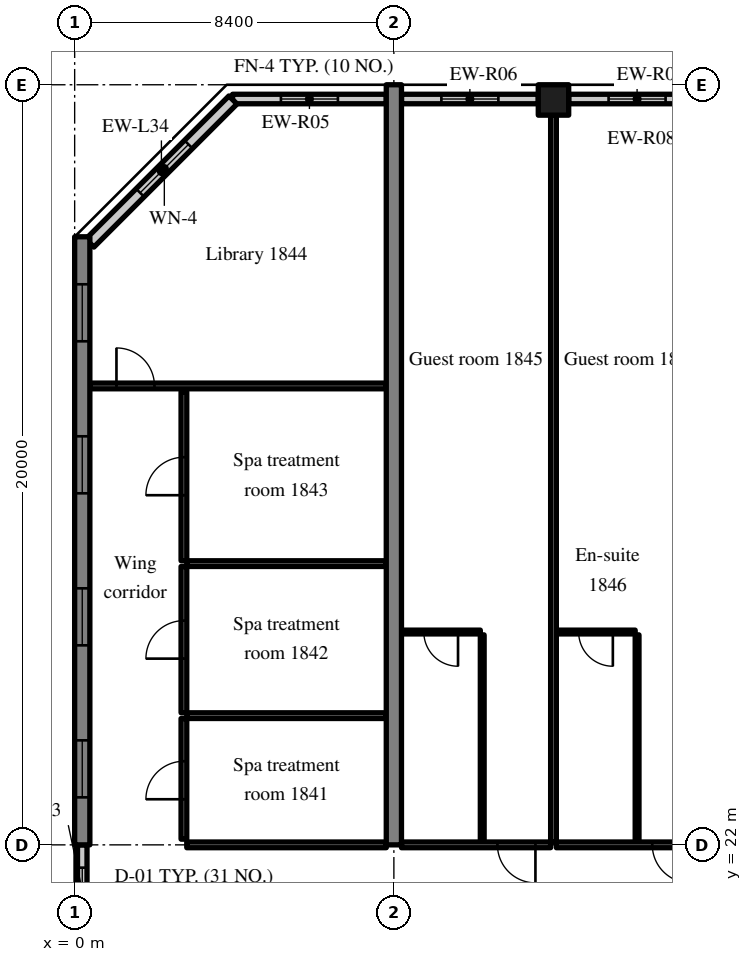
"""IFC4 building model, lengths in metres.
Left out: names, types, materials, properties, quantities, classifications, styles, units other than length and angle.
Written with IfcOpenShell. Run it as: python <this file> out.ifc"""

import sys

from ifc_helpers import new_model, si_unit, direction, frame, frame_2d, origin, origin_2d, place, context, subcontext, project, spatial, rectangle, extrude, source, transform, mapped, element, fill, save


model = new_model("IFC4")
c1 = context("Model", 3, precision=1e-05, world=origin(), true_north=direction((0.0, 1.0)))
c2 = subcontext(c1, "Body", "Model", "MODEL_VIEW")
j1 = project(units=[si_unit("LENGTHUNIT", "METRE"), si_unit("PLANEANGLEUNIT", "RADIAN")], contexts=[c1])
p1 = place(None, origin())
s1 = spatial("IfcSite", under=j1, at=p1, CompositionType="ELEMENT")
p2 = place(p1, origin())
s2 = spatial("IfcBuilding", under=s1, at=p2, CompositionType="ELEMENT")
p3 = place(p2, frame((0.0, 0.0, 77.2)))
s3 = spatial("IfcBuildingStorey", under=s2, at=p3, CompositionType="ELEMENT", Elevation=77.2)
m1 = source(origin(), c2, "Body", "SweptSolid", [
    extrude(rectangle(XDim=16.0, YDim=0.4, at=frame_2d((8.0, 0.0))), origin(), (0.0, 0.0, 1.0), 3.52),
])
p4 = place(p3, frame((0.2, 22.0, 0.0), z_axis=(0.0, 0.0, 1.0), x_axis=(0.0, 1.0, 0.0)))
e1 = element("IfcWall", 1, at=p4, inside=s3, PredefinedType="SHEAR", context=c2, shape_type="MappedRepresentation", body=[
    mapped(m1, transform((0.0, 0.0, 0.0), scale=1.0)),
])
m2 = source(origin(), c2, "Body", "SweptSolid", [
    extrude(rectangle(XDim=1.5, YDim=1.5, at=frame_2d((0.75, 0.75))), frame((0.0, 0.21, 0.0), z_axis=(0.0, -1.0, 0.0), x_axis=(1.0, 0.0, 0.0)), (0.0, 0.0, 1.0), 0.42),
])
p5 = place(p4, frame((1.25, 0.0, 0.9)))
e2 = element("IfcOpeningElement", 2, at=p5, cuts=e1, PredefinedType="OPENING", context=c2, shape_type="MappedRepresentation", body=[
    mapped(m2, transform((0.0, 0.0, 0.0), scale=1.0)),
])
p6 = place(p4, frame((5.25, 0.0, 0.9)))
e3 = element("IfcOpeningElement", 3, at=p6, cuts=e1, PredefinedType="OPENING", context=c2, shape_type="MappedRepresentation", body=[
    mapped(m2, transform((0.0, 0.0, 0.0), scale=1.0)),
])
p7 = place(p4, frame((9.25, 0.0, 0.9)))
e4 = element("IfcOpeningElement", 4, at=p7, cuts=e1, PredefinedType="OPENING", context=c2, shape_type="MappedRepresentation", body=[
    mapped(m2, transform((0.0, 0.0, 0.0), scale=1.0)),
])
p8 = place(p4, frame((13.25, 0.0, 0.9)))
e5 = element("IfcOpeningElement", 5, at=p8, cuts=e1, PredefinedType="OPENING", context=c2, shape_type="MappedRepresentation", body=[
    mapped(m2, transform((0.0, 0.0, 0.0), scale=1.0)),
])
m3 = source(origin(), c2, "Body", "SweptSolid", [
    extrude(rectangle(XDim=20.0, YDim=0.4, at=frame_2d((10.0, 0.0))), origin(), (0.0, 0.0, 1.0), 3.52),
])
p9 = place(p3, frame((8.4, 22.0, 0.0), z_axis=(0.0, 0.0, 1.0), x_axis=(0.0, 1.0, 0.0)))
e6 = element("IfcWall", 6, at=p9, inside=s3, PredefinedType="SHEAR", context=c2, shape_type="MappedRepresentation", body=[
    mapped(m3, transform((0.0, 0.0, 0.0), scale=1.0)),
])
m4 = source(origin(), c2, "Body", "SweptSolid", [
    extrude(rectangle(XDim=0.8, YDim=0.8, at=origin_2d()), origin(), (0.0, 0.0, 1.0), 3.52),
])
p10 = place(p3, frame((12.6, 41.6, 0.0), z_axis=(0.0, 0.0, 1.0), x_axis=(1.0, 0.0, 0.0)))
e7 = element("IfcColumn", 7, at=p10, inside=s3, PredefinedType="COLUMN", context=c2, shape_type="MappedRepresentation", body=[
    mapped(m4, transform((0.0, 0.0, 0.0), scale=1.0)),
])
m5 = source(origin(), c2, "Body", "SweptSolid", [
    extrude(rectangle(XDim=4.045, YDim=0.25, at=frame_2d((2.022, 0.0))), origin(), (0.0, 0.0, 1.0), 2.82),
])
p11 = place(p3, frame((8.2, 41.625, 0.0), z_axis=(0.0, 0.0, 1.0), x_axis=(-1.0, 0.0, 0.0)))
e8 = element("IfcWall", 8, at=p11, inside=s3, PredefinedType="SOLIDWALL", context=c2, shape_type="MappedRepresentation", body=[
    mapped(m5, transform((0.0, 0.0, 0.0), scale=1.0)),
])
m6 = source(origin(), c2, "Body", "SweptSolid", [
    extrude(rectangle(XDim=1.5, YDim=1.5, at=frame_2d((0.75, 0.75))), frame((0.0, 0.135, 0.0), z_axis=(0.0, -1.0, 0.0), x_axis=(1.0, 0.0, 0.0)), (0.0, 0.0, 1.0), 0.27),
])
p12 = place(p11, frame((1.272, 0.0, 0.9)))
e9 = element("IfcOpeningElement", 9, at=p12, cuts=e8, PredefinedType="OPENING", context=c2, shape_type="MappedRepresentation", body=[
    mapped(m6, transform((0.0, 0.0, 0.0), scale=1.0)),
])
m7 = source(origin(), c2, "Body", "SweptSolid", [
    extrude(rectangle(XDim=3.6, YDim=0.25, at=frame_2d((1.8, 0.0))), origin(), (0.0, 0.0, 1.0), 2.82),
])
p13 = place(p3, frame((12.2, 41.625, 0.0), z_axis=(0.0, 0.0, 1.0), x_axis=(-1.0, 0.0, 0.0)))
e10 = element("IfcWall", 10, at=p13, inside=s3, PredefinedType="SOLIDWALL", context=c2, shape_type="MappedRepresentation", body=[
    mapped(m7, transform((0.0, 0.0, 0.0), scale=1.0)),
])
p14 = place(p13, frame((1.05, 0.0, 0.9)))
e11 = element("IfcOpeningElement", 11, at=p14, cuts=e10, PredefinedType="OPENING", context=c2, shape_type="MappedRepresentation", body=[
    mapped(m6, transform((0.0, 0.0, 0.0), scale=1.0)),
])
m8 = source(origin(), c2, "Body", "SweptSolid", [
    extrude(rectangle(XDim=3.6, YDim=0.25, at=frame_2d((1.8, 0.0))), origin(), (0.0, 0.0, 1.0), 2.82),
])
p15 = place(p3, frame((16.6, 41.625, 0.0), z_axis=(0.0, 0.0, 1.0), x_axis=(-1.0, 0.0, 0.0)))
e12 = element("IfcWall", 12, at=p15, inside=s3, PredefinedType="SOLIDWALL", context=c2, shape_type="MappedRepresentation", body=[
    mapped(m8, transform((0.0, 0.0, 0.0), scale=1.0)),
])
p16 = place(p15, frame((1.05, 0.0, 0.9)))
e13 = element("IfcOpeningElement", 13, at=p16, cuts=e12, PredefinedType="OPENING", context=c2, shape_type="MappedRepresentation", body=[
    mapped(m6, transform((0.0, 0.0, 0.0), scale=1.0)),
])
m9 = source(origin(), c2, "Body", "SweptSolid", [
    extrude(rectangle(XDim=5.326, YDim=0.3, at=frame_2d((2.663, 0.0))), origin(), (0.0, 0.0, 1.0), 3.52),
])
p17 = place(p3, frame((4.166, 41.6, 0.0), z_axis=(0.0, 0.0, 1.0), x_axis=(-0.707106781187, -0.707106781187, 0.0)))
e14 = element("IfcWall", 14, at=p17, inside=s3, PredefinedType="SOLIDWALL", context=c2, shape_type="MappedRepresentation", body=[
    mapped(m9, transform((0.0, 0.0, 0.0), scale=1.0)),
])
m10 = source(origin(), c2, "Body", "SweptSolid", [
    extrude(rectangle(XDim=1.8, YDim=1.5, at=frame_2d((0.9, 0.75))), frame((0.0, 0.16, 0.0), z_axis=(0.0, -1.0, 0.0), x_axis=(1.0, 0.0, 0.0)), (0.0, 0.0, 1.0), 0.32),
])
p18 = place(p17, frame((1.654, 0.0, 0.9)))
e15 = element("IfcOpeningElement", 15, at=p18, cuts=e14, PredefinedType="OPENING", context=c2, shape_type="MappedRepresentation", body=[
    mapped(m10, transform((0.0, 0.0, 0.0), scale=1.0)),
])
m11 = source(origin(), c2, "Body", "SweptSolid", [
    extrude(rectangle(XDim=2.4, YDim=0.25, at=frame_2d((1.2, 0.0))), origin(), (0.0, 0.0, 1.0), 2.62),
])
p19 = place(p3, frame((0.2, 19.6, 0.0), z_axis=(0.0, 0.0, 1.0), x_axis=(0.0, 1.0, 0.0)))
e16 = element("IfcWall", 16, at=p19, inside=s3, PredefinedType="SOLIDWALL", context=c2, shape_type="MappedRepresentation", body=[
    mapped(m11, transform((0.0, 0.0, 0.0), scale=1.0)),
])
m12 = source(origin(), c2, "Body", "SweptSolid", [
    extrude(rectangle(XDim=1.2, YDim=1.5, at=frame_2d((0.6, 0.75))), frame((0.0, 0.135, 0.0), z_axis=(0.0, -1.0, 0.0), x_axis=(1.0, 0.0, 0.0)), (0.0, 0.0, 1.0), 0.27),
])
p20 = place(p19, frame((0.6, 0.0, 0.9)))
e17 = element("IfcOpeningElement", 17, at=p20, cuts=e16, PredefinedType="OPENING", context=c2, shape_type="MappedRepresentation", body=[
    mapped(m12, transform((0.0, 0.0, 0.0), scale=1.0)),
])
m13 = source(origin(), c2, "Body", "SweptSolid", [
    extrude(rectangle(XDim=5.25, YDim=0.15, at=frame_2d((2.625, 0.0))), origin(), (0.0, 0.0, 1.0), 2.82),
])
p21 = place(p3, frame((2.95, 22.0, 0.0), z_axis=(0.0, 0.0, 1.0), x_axis=(1.0, 0.0, 0.0)))
e18 = element("IfcWall", 18, at=p21, inside=s3, PredefinedType="PARTITIONING", context=c2, shape_type="MappedRepresentation", body=[
    mapped(m13, transform((0.0, 0.0, 0.0), scale=1.0)),
])
m14 = source(origin(), c2, "Body", "SweptSolid", [
    extrude(rectangle(XDim=3.175, YDim=0.15, at=frame_2d((1.587, 0.0))), origin(), (0.0, 0.0, 1.0), 3.52),
])
p22 = place(p3, frame((2.875, 22.15, 0.0), z_axis=(0.0, 0.0, 1.0), x_axis=(0.0, 1.0, 0.0)))
e19 = element("IfcWall", 19, at=p22, inside=s3, PredefinedType="PARTITIONING", context=c2, shape_type="MappedRepresentation", body=[
    mapped(m14, transform((0.0, 0.0, 0.0), scale=1.0)),
])
m15 = source(origin(), c2, "Body", "SweptSolid", [
    extrude(rectangle(XDim=1.0, YDim=2.1, at=frame_2d((0.5, 1.05))), frame((0.0, 0.085, 0.0), z_axis=(0.0, -1.0, 0.0), x_axis=(1.0, 0.0, 0.0)), (0.0, 0.0, 1.0), 0.17),
])
p23 = place(p22, frame((1.05, 0.0, 0.0)))
e20 = element("IfcOpeningElement", 20, at=p23, cuts=e19, PredefinedType="OPENING", context=c2, shape_type="MappedRepresentation", body=[
    mapped(m15, transform((0.0, 0.0, 0.0), scale=1.0)),
])
m16 = source(origin(), c2, "Body", "SweptSolid", [
    extrude(rectangle(XDim=5.25, YDim=0.15, at=frame_2d((2.625, 0.0))), origin(), (0.0, 0.0, 1.0), 3.52),
])
p24 = place(p3, frame((2.95, 25.4, 0.0), z_axis=(0.0, 0.0, 1.0), x_axis=(1.0, 0.0, 0.0)))
e21 = element("IfcWall", 21, at=p24, inside=s3, PredefinedType="PARTITIONING", context=c2, shape_type="MappedRepresentation", body=[
    mapped(m16, transform((0.0, 0.0, 0.0), scale=1.0)),
])
m17 = source(origin(), c2, "Body", "SweptSolid", [
    extrude(rectangle(XDim=3.85, YDim=0.15, at=frame_2d((1.925, 0.0))), origin(), (0.0, 0.0, 1.0), 3.52),
])
p25 = place(p3, frame((2.875, 25.475, 0.0), z_axis=(0.0, 0.0, 1.0), x_axis=(0.0, 1.0, 0.0)))
e22 = element("IfcWall", 22, at=p25, inside=s3, PredefinedType="PARTITIONING", context=c2, shape_type="MappedRepresentation", body=[
    mapped(m17, transform((0.0, 0.0, 0.0), scale=1.0)),
])
p26 = place(p25, frame((1.425, 0.0, 0.0)))
e23 = element("IfcOpeningElement", 23, at=p26, cuts=e22, PredefinedType="OPENING", context=c2, shape_type="MappedRepresentation", body=[
    mapped(m15, transform((0.0, 0.0, 0.0), scale=1.0)),
])
p27 = place(p3, frame((2.95, 29.4, 0.0), z_axis=(0.0, 0.0, 1.0), x_axis=(1.0, 0.0, 0.0)))
e24 = element("IfcWall", 24, at=p27, inside=s3, PredefinedType="PARTITIONING", context=c2, shape_type="MappedRepresentation", body=[
    mapped(m16, transform((0.0, 0.0, 0.0), scale=1.0)),
])
m18 = source(origin(), c2, "Body", "SweptSolid", [
    extrude(rectangle(XDim=4.45, YDim=0.15, at=frame_2d((2.225, 0.0))), origin(), (0.0, 0.0, 1.0), 3.52),
])
p28 = place(p3, frame((2.875, 29.475, 0.0), z_axis=(0.0, 0.0, 1.0), x_axis=(0.0, 1.0, 0.0)))
e25 = element("IfcWall", 25, at=p28, inside=s3, PredefinedType="PARTITIONING", context=c2, shape_type="MappedRepresentation", body=[
    mapped(m18, transform((0.0, 0.0, 0.0), scale=1.0)),
])
p29 = place(p28, frame((1.725, 0.0, 0.0)))
e26 = element("IfcOpeningElement", 26, at=p29, cuts=e25, PredefinedType="OPENING", context=c2, shape_type="MappedRepresentation", body=[
    mapped(m15, transform((0.0, 0.0, 0.0), scale=1.0)),
])
m19 = source(origin(), c2, "Body", "SweptSolid", [
    extrude(rectangle(XDim=7.8, YDim=0.15, at=frame_2d((3.9, 0.0))), origin(), (0.0, 0.0, 1.0), 3.52),
])
p30 = place(p3, frame((0.4, 34.075, 0.0), z_axis=(0.0, 0.0, 1.0), x_axis=(1.0, 0.0, 0.0)))
e27 = element("IfcWall", 27, at=p30, inside=s3, PredefinedType="PARTITIONING", context=c2, shape_type="MappedRepresentation", body=[
    mapped(m19, transform((0.0, 0.0, 0.0), scale=1.0)),
])
p31 = place(p30, frame((0.7, 0.0, 0.0)))
e28 = element("IfcOpeningElement", 28, at=p31, cuts=e27, PredefinedType="OPENING", context=c2, shape_type="MappedRepresentation", body=[
    mapped(m15, transform((0.0, 0.0, 0.0), scale=1.0)),
])
m20 = source(origin(), c2, "Body", "SweptSolid", [
    extrude(rectangle(XDim=5.45, YDim=0.1, at=frame_2d((2.725, 0.0))), origin(), (0.0, 0.0, 1.0), 3.52),
])
p32 = place(p3, frame((10.725, 22.075, 0.0), z_axis=(0.0, 0.0, 1.0), x_axis=(0.0, 1.0, 0.0)))
e29 = element("IfcWall", 29, at=p32, inside=s3, PredefinedType="PARTITIONING", context=c2, shape_type="MappedRepresentation", body=[
    mapped(m20, transform((0.0, 0.0, 0.0), scale=1.0)),
])
m21 = source(origin(), c2, "Body", "SweptSolid", [
    extrude(rectangle(XDim=2.075, YDim=0.1, at=frame_2d((1.038, 0.0))), origin(), (0.0, 0.0, 1.0), 3.52),
])
p33 = place(p3, frame((8.6, 27.6, 0.0), z_axis=(0.0, 0.0, 1.0), x_axis=(1.0, 0.0, 0.0)))
e30 = element("IfcWall", 30, at=p33, inside=s3, PredefinedType="PARTITIONING", context=c2, shape_type="MappedRepresentation", body=[
    mapped(m21, transform((0.0, 0.0, 0.0), scale=1.0)),
])
m22 = source(origin(), c2, "Body", "SweptSolid", [
    extrude(rectangle(XDim=0.9, YDim=2.1, at=frame_2d((0.45, 1.05))), frame((0.0, 0.06, 0.0), z_axis=(0.0, -1.0, 0.0), x_axis=(1.0, 0.0, 0.0)), (0.0, 0.0, 1.0), 0.12),
])
p34 = place(p33, frame((0.588, 0.0, 0.0)))
e31 = element("IfcOpeningElement", 31, at=p34, cuts=e30, PredefinedType="OPENING", context=c2, shape_type="MappedRepresentation", body=[
    mapped(m22, transform((0.0, 0.0, 0.0), scale=1.0)),
])
m23 = source(origin(), c2, "Body", "SweptSolid", [
    extrude(rectangle(XDim=3.925, YDim=0.15, at=frame_2d((1.962, 0.0))), origin(), (0.0, 0.0, 1.0), 2.82),
])
p35 = place(p3, frame((8.6, 22.0, 0.0), z_axis=(0.0, 0.0, 1.0), x_axis=(1.0, 0.0, 0.0)))
e32 = element("IfcWall", 32, at=p35, inside=s3, PredefinedType="PARTITIONING", context=c2, shape_type="MappedRepresentation", body=[
    mapped(m23, transform((0.0, 0.0, 0.0), scale=1.0)),
])
p36 = place(p35, frame((2.525, 0.0, 0.0)))
e33 = element("IfcOpeningElement", 33, at=p36, cuts=e32, PredefinedType="OPENING", context=c2, shape_type="MappedRepresentation", body=[
    mapped(m15, transform((0.0, 0.0, 0.0), scale=1.0)),
])
p37 = place(p3, frame((14.8, 22.075, 0.0), z_axis=(0.0, 0.0, 1.0), x_axis=(0.0, 1.0, 0.0)))
e34 = element("IfcWall", 34, at=p37, inside=s3, PredefinedType="PARTITIONING", context=c2, shape_type="MappedRepresentation", body=[
    mapped(m20, transform((0.0, 0.0, 0.0), scale=1.0)),
])
p38 = place(p3, frame((12.675, 27.6, 0.0), z_axis=(0.0, 0.0, 1.0), x_axis=(1.0, 0.0, 0.0)))
e35 = element("IfcWall", 35, at=p38, inside=s3, PredefinedType="PARTITIONING", context=c2, shape_type="MappedRepresentation", body=[
    mapped(m21, transform((0.0, 0.0, 0.0), scale=1.0)),
])
p39 = place(p38, frame((0.587, 0.0, 0.0)))
e36 = element("IfcOpeningElement", 36, at=p39, cuts=e35, PredefinedType="OPENING", context=c2, shape_type="MappedRepresentation", body=[
    mapped(m22, transform((0.0, 0.0, 0.0), scale=1.0)),
])
m24 = source(origin(), c2, "Body", "SweptSolid", [
    extrude(rectangle(XDim=3.925, YDim=0.15, at=frame_2d((1.962, 0.0))), origin(), (0.0, 0.0, 1.0), 2.82),
])
p40 = place(p3, frame((12.675, 22.0, 0.0), z_axis=(0.0, 0.0, 1.0), x_axis=(1.0, 0.0, 0.0)))
e37 = element("IfcWall", 37, at=p40, inside=s3, PredefinedType="PARTITIONING", context=c2, shape_type="MappedRepresentation", body=[
    mapped(m24, transform((0.0, 0.0, 0.0), scale=1.0)),
])
p41 = place(p40, frame((2.525, 0.0, 0.0)))
e38 = element("IfcOpeningElement", 38, at=p41, cuts=e37, PredefinedType="OPENING", context=c2, shape_type="MappedRepresentation", body=[
    mapped(m15, transform((0.0, 0.0, 0.0), scale=1.0)),
])
m25 = source(origin(), c2, "Body", "SweptSolid", [
    extrude(rectangle(XDim=19.125, YDim=0.15, at=frame_2d((9.562, 0.0))), origin(), (0.0, 0.0, 1.0), 3.52),
])
p42 = place(p3, frame((12.6, 22.075, 0.0), z_axis=(0.0, 0.0, 1.0), x_axis=(0.0, 1.0, 0.0)))
e39 = element("IfcWall", 39, at=p42, inside=s3, PredefinedType="PARTITIONING", context=c2, shape_type="MappedRepresentation", body=[
    mapped(m25, transform((0.0, 0.0, 0.0), scale=1.0)),
])
m26 = source(origin(), c2, "Body", "SweptSolid", [
    extrude(rectangle(XDim=1.5, YDim=1.5, at=frame_2d((0.75, 0.75))), frame((0.0, 0.03, 0.0), z_axis=(0.0, -1.0, 0.0), x_axis=(1.0, 0.0, 0.0)), (0.0, 0.0, 1.0), 0.06),
])
p43 = place(p12, origin())
e40 = element("IfcWindow", 40, at=p43, inside=s3, PartitioningType="SINGLE_PANEL", PredefinedType="WINDOW", context=c2, shape_type="MappedRepresentation", body=[
    mapped(m26, transform((0.0, 0.0, 0.0), scale=1.0)),
])
fill(e9, e40)
p44 = place(p14, origin())
e41 = element("IfcWindow", 41, at=p44, inside=s3, PartitioningType="SINGLE_PANEL", PredefinedType="WINDOW", context=c2, shape_type="MappedRepresentation", body=[
    mapped(m26, transform((0.0, 0.0, 0.0), scale=1.0)),
])
fill(e11, e41)
p45 = place(p16, origin())
e42 = element("IfcWindow", 42, at=p45, inside=s3, PartitioningType="SINGLE_PANEL", PredefinedType="WINDOW", context=c2, shape_type="MappedRepresentation", body=[
    mapped(m26, transform((0.0, 0.0, 0.0), scale=1.0)),
])
fill(e13, e42)
m27 = source(origin(), c2, "Body", "SweptSolid", [
    extrude(rectangle(XDim=1.8, YDim=1.5, at=frame_2d((0.9, 0.75))), frame((0.0, 0.03, 0.0), z_axis=(0.0, -1.0, 0.0), x_axis=(1.0, 0.0, 0.0)), (0.0, 0.0, 1.0), 0.06),
])
p46 = place(p18, origin())
e43 = element("IfcWindow", 43, at=p46, inside=s3, PartitioningType="SINGLE_PANEL", PredefinedType="WINDOW", context=c2, shape_type="MappedRepresentation", body=[
    mapped(m27, transform((0.0, 0.0, 0.0), scale=1.0)),
])
fill(e15, e43)
p47 = place(p5, origin())
e44 = element("IfcWindow", 44, at=p47, inside=s3, PartitioningType="SINGLE_PANEL", PredefinedType="WINDOW", context=c2, shape_type="MappedRepresentation", body=[
    mapped(m26, transform((0.0, 0.0, 0.0), scale=1.0)),
])
fill(e2, e44)
p48 = place(p6, origin())
e45 = element("IfcWindow", 45, at=p48, inside=s3, PartitioningType="SINGLE_PANEL", PredefinedType="WINDOW", context=c2, shape_type="MappedRepresentation", body=[
    mapped(m26, transform((0.0, 0.0, 0.0), scale=1.0)),
])
fill(e3, e45)
p49 = place(p7, origin())
e46 = element("IfcWindow", 46, at=p49, inside=s3, PartitioningType="SINGLE_PANEL", PredefinedType="WINDOW", context=c2, shape_type="MappedRepresentation", body=[
    mapped(m26, transform((0.0, 0.0, 0.0), scale=1.0)),
])
fill(e4, e46)
p50 = place(p8, origin())
e47 = element("IfcWindow", 47, at=p50, inside=s3, PartitioningType="SINGLE_PANEL", PredefinedType="WINDOW", context=c2, shape_type="MappedRepresentation", body=[
    mapped(m26, transform((0.0, 0.0, 0.0), scale=1.0)),
])
fill(e5, e47)
m28 = source(origin(), c2, "Body", "SweptSolid", [
    extrude(rectangle(XDim=1.2, YDim=1.5, at=frame_2d((0.6, 0.75))), frame((0.0, 0.03, 0.0), z_axis=(0.0, -1.0, 0.0), x_axis=(1.0, 0.0, 0.0)), (0.0, 0.0, 1.0), 0.06),
])
p51 = place(p20, origin())
e48 = element("IfcWindow", 48, at=p51, inside=s3, PartitioningType="SINGLE_PANEL", PredefinedType="WINDOW", context=c2, shape_type="MappedRepresentation", body=[
    mapped(m28, transform((0.0, 0.0, 0.0), scale=1.0)),
])
fill(e17, e48)
m29 = source(origin(), c2, "Body", "SweptSolid", [
    extrude(rectangle(XDim=1.0, YDim=2.1, at=frame_2d((0.5, 1.05))), frame((0.0, 0.025, 0.0), z_axis=(0.0, -1.0, 0.0), x_axis=(1.0, 0.0, 0.0)), (0.0, 0.0, 1.0), 0.05),
])
p52 = place(p23, origin())
e49 = element("IfcDoor", 49, at=p52, inside=s3, OperationType="SINGLE_SWING_LEFT", PredefinedType="DOOR", context=c2, shape_type="MappedRepresentation", body=[
    mapped(m29, transform((0.0, 0.0, 0.0), scale=1.0)),
])
fill(e20, e49)
p53 = place(p26, origin())
e50 = element("IfcDoor", 50, at=p53, inside=s3, OperationType="SINGLE_SWING_LEFT", PredefinedType="DOOR", context=c2, shape_type="MappedRepresentation", body=[
    mapped(m29, transform((0.0, 0.0, 0.0), scale=1.0)),
])
fill(e23, e50)
p54 = place(p29, origin())
e51 = element("IfcDoor", 51, at=p54, inside=s3, OperationType="SINGLE_SWING_LEFT", PredefinedType="DOOR", context=c2, shape_type="MappedRepresentation", body=[
    mapped(m29, transform((0.0, 0.0, 0.0), scale=1.0)),
])
fill(e26, e51)
p55 = place(p31, origin())
e52 = element("IfcDoor", 52, at=p55, inside=s3, OperationType="SINGLE_SWING_LEFT", PredefinedType="DOOR", context=c2, shape_type="MappedRepresentation", body=[
    mapped(m29, transform((0.0, 0.0, 0.0), scale=1.0)),
])
fill(e28, e52)
m30 = source(origin(), c2, "Body", "SweptSolid", [
    extrude(rectangle(XDim=0.9, YDim=2.1, at=frame_2d((0.45, 1.05))), frame((0.0, 0.025, 0.0), z_axis=(0.0, -1.0, 0.0), x_axis=(1.0, 0.0, 0.0)), (0.0, 0.0, 1.0), 0.05),
])
p56 = place(p34, origin())
e53 = element("IfcDoor", 53, at=p56, inside=s3, OperationType="SINGLE_SWING_RIGHT", PredefinedType="DOOR", context=c2, shape_type="MappedRepresentation", body=[
    mapped(m30, transform((0.0, 0.0, 0.0), scale=1.0)),
])
fill(e31, e53)
p57 = place(p36, origin())
e54 = element("IfcDoor", 54, at=p57, inside=s3, OperationType="SINGLE_SWING_RIGHT", PredefinedType="DOOR", context=c2, shape_type="MappedRepresentation", body=[
    mapped(m29, transform((0.0, 0.0, 0.0), scale=1.0)),
])
fill(e33, e54)
p58 = place(p39, origin())
e55 = element("IfcDoor", 55, at=p58, inside=s3, OperationType="SINGLE_SWING_RIGHT", PredefinedType="DOOR", context=c2, shape_type="MappedRepresentation", body=[
    mapped(m30, transform((0.0, 0.0, 0.0), scale=1.0)),
])
fill(e36, e55)
p59 = place(p41, origin())
e56 = element("IfcDoor", 56, at=p59, inside=s3, OperationType="SINGLE_SWING_RIGHT", PredefinedType="DOOR", context=c2, shape_type="MappedRepresentation", body=[
    mapped(m29, transform((0.0, 0.0, 0.0), scale=1.0)),
])
fill(e38, e56)
save(model, sys.argv[1])
